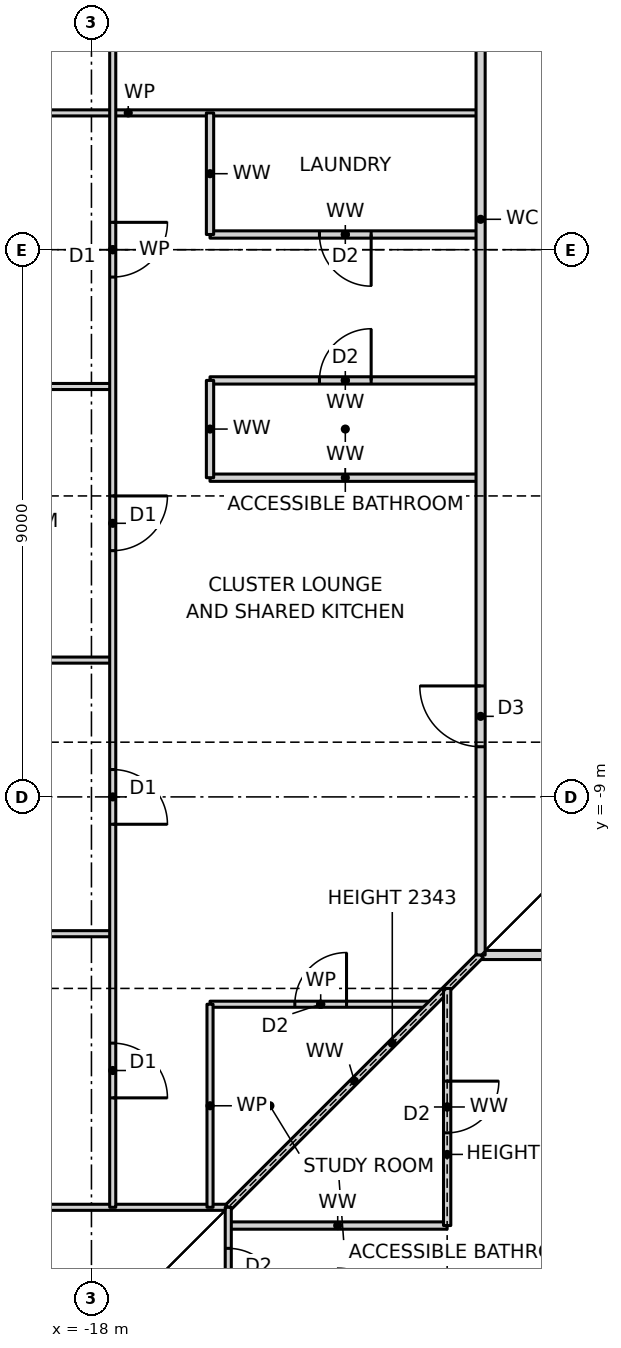
"""IFC4 building model, lengths in metres.
Left out: names, types, materials, properties, quantities, classifications, styles, units other than length and angle.
Written with IfcOpenShell. Run it as: python <this file> out.ifc"""

import sys

from ifc_helpers import new_model, si_unit, direction, frame, frame_2d, origin, place, context, subcontext, project, spatial, rectangle, extrude, element, fill, save


model = new_model("IFC4")
c1 = context("Model", 3, precision=1e-05, world=origin(), true_north=direction((0.0, 1.0)))
c2 = subcontext(c1, "Body", "Model", "MODEL_VIEW")
j1 = project(units=[si_unit("LENGTHUNIT", "METRE"), si_unit("PLANEANGLEUNIT", "RADIAN")], contexts=[c1])
p1 = place(None, origin())
s1 = spatial("IfcSite", under=j1, at=p1, CompositionType="ELEMENT")
p2 = place(p1, origin())
s2 = spatial("IfcBuilding", under=s1, at=p2, CompositionType="ELEMENT")
p3 = place(p2, frame((0.0, 0.0, 60.5)))
s3 = spatial("IfcBuildingStorey", under=s2, at=p3, CompositionType="ELEMENT", Elevation=60.5)
p4 = place(p3, frame((-15.75, -16.05, 0.0), z_axis=(0.0, 0.0, 1.0), x_axis=(1.0, 0.0, 0.0)))
e1 = element("IfcWall", 1, at=p4, inside=s3, PredefinedType="PARTITIONING", context=c2, shape_type="SweptSolid", body=[
    extrude(rectangle(XDim=3.6, YDim=0.12, at=frame_2d((1.8, 0.0))), origin(), (0.0, 0.0, 1.0), 3.27),
])
p5 = place(p3, frame((-23.19, -15.75, 0.0), z_axis=(0.0, 0.0, 1.0), x_axis=(1.0, 0.0, 0.0)))
e2 = element("IfcWall", 2, at=p5, inside=s3, PredefinedType="PARTITIONING", context=c2, shape_type="SweptSolid", body=[
    extrude(rectangle(XDim=7.44, YDim=0.1, at=frame_2d((3.72, 0.0))), origin(), (0.0, 0.0, 1.0), 3.27),
])
p6 = place(p3, frame((-16.05, -12.41, 0.0), z_axis=(0.0, 0.0, 1.0), x_axis=(1.0, 0.0, 0.0)))
e3 = element("IfcWall", 3, at=p6, inside=s3, PredefinedType="PARTITIONING", context=c2, shape_type="SweptSolid", body=[
    extrude(rectangle(XDim=3.64, YDim=0.1, at=frame_2d((1.82, 0.0))), origin(), (0.0, 0.0, 1.0), 3.27),
])
p7 = place(p6, frame((1.395, 0.0, 0.0)))
e4 = element("IfcOpeningElement", 4, at=p7, cuts=e3, PredefinedType="OPENING", context=c2, shape_type="SweptSolid", body=[
    extrude(rectangle(XDim=0.85, YDim=2.1, at=frame_2d((0.425, 1.05))), frame((0.0, 0.06, 0.0), z_axis=(0.0, -1.0, 0.0), x_axis=(1.0, 0.0, 0.0)), (0.0, 0.0, 1.0), 0.12),
])
p8 = place(p3, frame((-11.6, -11.6, 0.0), z_axis=(0.0, 0.0, 1.0), x_axis=(1.0, 0.0, 0.0)))
e5 = element("IfcWall", 5, at=p8, inside=s3, PredefinedType="PARTITIONING", context=c2, shape_type="SweptSolid", body=[
    extrude(rectangle(XDim=23.2, YDim=0.15, at=frame_2d((11.6, 0.0))), origin(), (0.0, 0.0, 1.0), 3.27),
])
p9 = place(p8, frame((2.655, 0.0, 0.0)))
e6 = element("IfcOpeningElement", 6, at=p9, cuts=e5, PredefinedType="OPENING", context=c2, shape_type="SweptSolid", body=[
    extrude(rectangle(XDim=1.0, YDim=2.1, at=frame_2d((0.5, 1.05))), frame((0.0, 0.085, 0.0), z_axis=(0.0, -1.0, 0.0), x_axis=(1.0, 0.0, 0.0)), (0.0, 0.0, 1.0), 0.17),
])
p10 = place(p8, frame((12.5, 0.0, 0.0)))
e7 = element("IfcOpeningElement", 7, at=p10, cuts=e5, PredefinedType="OPENING", context=c2, shape_type="SweptSolid", body=[
    extrude(rectangle(XDim=0.9, YDim=2.1, at=frame_2d((0.45, 1.05))), frame((0.0, 0.085, 0.0), z_axis=(0.0, -1.0, 0.0), x_axis=(1.0, 0.0, 0.0)), (0.0, 0.0, 1.0), 0.17),
])
p11 = place(p8, frame((21.025, 0.0, 0.0)))
e8 = element("IfcOpeningElement", 8, at=p11, cuts=e5, PredefinedType="OPENING", context=c2, shape_type="SweptSolid", body=[
    extrude(rectangle(XDim=1.0, YDim=2.1, at=frame_2d((0.5, 1.05))), frame((0.0, 0.085, 0.0), z_axis=(0.0, -1.0, 0.0), x_axis=(1.0, 0.0, 0.0)), (0.0, 0.0, 1.0), 0.17),
])
for number, where, z_axis, x_axis in (
    (9, (-23.19, -11.25, 0.0), (0.0, 0.0, 1.0), (1.0, 0.0, 0.0)),
    (10, (-23.19, -6.75, 0.0), (0.0, 0.0, 1.0), (1.0, 0.0, 0.0)),
):
    element("IfcWall", number, at=place(p3, frame(where, z_axis=z_axis, x_axis=x_axis)), inside=s3, PredefinedType="PARTITIONING", context=c2, shape_type="SweptSolid", body=[
        extrude(rectangle(XDim=5.54, YDim=0.1, at=frame_2d((2.77, 0.0))), origin(), (0.0, 0.0, 1.0), 3.27),
    ])
p12 = place(p3, frame((-16.05, -3.75, 0.0), z_axis=(0.0, 0.0, 1.0), x_axis=(1.0, 0.0, 0.0)))
e11 = element("IfcWall", 11, at=p12, inside=s3, PredefinedType="PARTITIONING", context=c2, shape_type="SweptSolid", body=[
    extrude(rectangle(XDim=4.45, YDim=0.12, at=frame_2d((2.225, 0.0))), origin(), (0.0, 0.0, 1.0), 3.27),
])
p13 = place(p3, frame((-23.19, -2.25, 0.0), z_axis=(0.0, 0.0, 1.0), x_axis=(1.0, 0.0, 0.0)))
e12 = element("IfcWall", 12, at=p13, inside=s3, PredefinedType="PARTITIONING", context=c2, shape_type="SweptSolid", body=[
    extrude(rectangle(XDim=5.54, YDim=0.1, at=frame_2d((2.77, 0.0))), origin(), (0.0, 0.0, 1.0), 3.27),
])
p14 = place(p3, frame((-16.05, -2.15, 0.0), z_axis=(0.0, 0.0, 1.0), x_axis=(1.0, 0.0, 0.0)))
e13 = element("IfcWall", 13, at=p14, inside=s3, PredefinedType="PARTITIONING", context=c2, shape_type="SweptSolid", body=[
    extrude(rectangle(XDim=4.45, YDim=0.12, at=frame_2d((2.225, 0.0))), origin(), (0.0, 0.0, 1.0), 3.27),
])
p15 = place(p14, frame((1.8, 0.0, 0.0)))
e14 = element("IfcOpeningElement", 14, at=p15, cuts=e13, PredefinedType="OPENING", context=c2, shape_type="SweptSolid", body=[
    extrude(rectangle(XDim=0.85, YDim=2.1, at=frame_2d((0.425, 1.05))), frame((0.0, 0.07, 0.0), z_axis=(0.0, -1.0, 0.0), x_axis=(1.0, 0.0, 0.0)), (0.0, 0.0, 1.0), 0.14),
])
p16 = place(p3, frame((-16.05, 0.25, 0.0), z_axis=(0.0, 0.0, 1.0), x_axis=(1.0, 0.0, 0.0)))
e15 = element("IfcWall", 15, at=p16, inside=s3, PredefinedType="PARTITIONING", context=c2, shape_type="SweptSolid", body=[
    extrude(rectangle(XDim=4.45, YDim=0.12, at=frame_2d((2.225, 0.0))), origin(), (0.0, 0.0, 1.0), 3.27),
])
p17 = place(p16, frame((1.8, 0.0, 0.0)))
e16 = element("IfcOpeningElement", 16, at=p17, cuts=e15, PredefinedType="OPENING", context=c2, shape_type="SweptSolid", body=[
    extrude(rectangle(XDim=0.85, YDim=2.1, at=frame_2d((0.425, 1.05))), frame((0.0, 0.07, 0.0), z_axis=(0.0, -1.0, 0.0), x_axis=(1.0, 0.0, 0.0)), (0.0, 0.0, 1.0), 0.14),
])
p18 = place(p3, frame((-23.19, 2.25, 0.0), z_axis=(0.0, 0.0, 1.0), x_axis=(1.0, 0.0, 0.0)))
e17 = element("IfcWall", 17, at=p18, inside=s3, PredefinedType="PARTITIONING", context=c2, shape_type="SweptSolid", body=[
    extrude(rectangle(XDim=11.59, YDim=0.1, at=frame_2d((5.795, 0.0))), origin(), (0.0, 0.0, 1.0), 3.27),
])
p19 = place(p3, frame((-15.75, -15.75, 0.0), z_axis=(0.0, 0.0, 1.0), x_axis=(0.707106781187, 0.707106781187, 0.0)))
e18 = element("IfcWall", 18, at=p19, inside=s3, PredefinedType="PARTITIONING", context=c2, shape_type="SweptSolid", body=[
    extrude(rectangle(XDim=5.869, YDim=0.12, at=frame_2d((2.935, 0.0))), origin(), (0.0, 0.0, 1.0), 2.343),
])
p20 = place(p3, frame((-11.6, -11.6, 0.0), z_axis=(0.0, 0.0, 1.0), x_axis=(0.0, 1.0, 0.0)))
e19 = element("IfcWall", 19, at=p20, inside=s3, PredefinedType="PARTITIONING", context=c2, shape_type="SweptSolid", body=[
    extrude(rectangle(XDim=24.2, YDim=0.15, at=frame_2d((12.1, 0.0))), origin(), (0.0, 0.0, 1.0), 3.27),
])
p21 = place(p20, frame((19.225, 0.0, 0.0)))
e20 = element("IfcOpeningElement", 20, at=p21, cuts=e19, PredefinedType="OPENING", context=c2, shape_type="SweptSolid", body=[
    extrude(rectangle(XDim=1.0, YDim=2.1, at=frame_2d((0.5, 1.05))), frame((0.0, 0.085, 0.0), z_axis=(0.0, -1.0, 0.0), x_axis=(1.0, 0.0, 0.0)), (0.0, 0.0, 1.0), 0.17),
])
p22 = place(p20, frame((3.425, 0.0, 0.0)))
e21 = element("IfcOpeningElement", 21, at=p22, cuts=e19, PredefinedType="OPENING", context=c2, shape_type="SweptSolid", body=[
    extrude(rectangle(XDim=1.0, YDim=2.1, at=frame_2d((0.5, 1.05))), frame((0.0, 0.085, 0.0), z_axis=(0.0, -1.0, 0.0), x_axis=(1.0, 0.0, 0.0)), (0.0, 0.0, 1.0), 0.17),
])
p23 = place(p3, frame((-12.15, -16.05, 0.0), z_axis=(0.0, 0.0, 1.0), x_axis=(0.0, 1.0, 0.0)))
e22 = element("IfcWall", 22, at=p23, inside=s3, PredefinedType="PARTITIONING", context=c2, shape_type="SweptSolid", body=[
    extrude(rectangle(XDim=3.9, YDim=0.12, at=frame_2d((1.95, 0.0))), origin(), (0.0, 0.0, 1.0), 2.508),
])
p24 = place(p23, frame((1.525, 0.0, 0.0)))
e23 = element("IfcOpeningElement", 23, at=p24, cuts=e22, PredefinedType="OPENING", context=c2, shape_type="SweptSolid", body=[
    extrude(rectangle(XDim=0.85, YDim=2.1, at=frame_2d((0.425, 1.05))), frame((0.0, 0.07, 0.0), z_axis=(0.0, -1.0, 0.0), x_axis=(1.0, 0.0, 0.0)), (0.0, 0.0, 1.0), 0.14),
])
p25 = place(p3, frame((-15.75, -23.19, 0.0), z_axis=(0.0, 0.0, 1.0), x_axis=(0.0, 1.0, 0.0)))
e24 = element("IfcWall", 24, at=p25, inside=s3, PredefinedType="PARTITIONING", context=c2, shape_type="SweptSolid", body=[
    extrude(rectangle(XDim=7.44, YDim=0.1, at=frame_2d((3.72, 0.0))), origin(), (0.0, 0.0, 1.0), 3.27),
])
p26 = place(p25, frame((5.915, 0.0, 0.0)))
e25 = element("IfcOpeningElement", 25, at=p26, cuts=e24, PredefinedType="OPENING", context=c2, shape_type="SweptSolid", body=[
    extrude(rectangle(XDim=0.85, YDim=2.1, at=frame_2d((0.425, 1.05))), frame((0.0, 0.06, 0.0), z_axis=(0.0, -1.0, 0.0), x_axis=(1.0, 0.0, 0.0)), (0.0, 0.0, 1.0), 0.12),
])
p27 = place(p3, frame((-16.05, -15.75, 0.0), z_axis=(0.0, 0.0, 1.0), x_axis=(0.0, 1.0, 0.0)))
e26 = element("IfcWall", 26, at=p27, inside=s3, PredefinedType="PARTITIONING", context=c2, shape_type="SweptSolid", body=[
    extrude(rectangle(XDim=3.34, YDim=0.1, at=frame_2d((1.67, 0.0))), origin(), (0.0, 0.0, 1.0), 3.27),
])
p28 = place(p3, frame((-16.05, -3.75, 0.0), z_axis=(0.0, 0.0, 1.0), x_axis=(0.0, 1.0, 0.0)))
e27 = element("IfcWall", 27, at=p28, inside=s3, PredefinedType="PARTITIONING", context=c2, shape_type="SweptSolid", body=[
    extrude(rectangle(XDim=1.6, YDim=0.12, at=frame_2d((0.8, 0.0))), origin(), (0.0, 0.0, 1.0), 3.27),
])
p29 = place(p3, frame((-16.05, 0.25, 0.0), z_axis=(0.0, 0.0, 1.0), x_axis=(0.0, 1.0, 0.0)))
e28 = element("IfcWall", 28, at=p29, inside=s3, PredefinedType="PARTITIONING", context=c2, shape_type="SweptSolid", body=[
    extrude(rectangle(XDim=2.0, YDim=0.12, at=frame_2d((1.0, 0.0))), origin(), (0.0, 0.0, 1.0), 3.27),
])
p30 = place(p3, frame((-17.65, -15.75, 0.0), z_axis=(0.0, 0.0, 1.0), x_axis=(0.0, 1.0, 0.0)))
e29 = element("IfcWall", 29, at=p30, inside=s3, PredefinedType="PARTITIONING", context=c2, shape_type="SweptSolid", body=[
    extrude(rectangle(XDim=31.5, YDim=0.1, at=frame_2d((15.75, 0.0))), origin(), (0.0, 0.0, 1.0), 3.27),
])
p31 = place(p30, frame((28.8, 0.0, 0.0)))
e30 = element("IfcOpeningElement", 30, at=p31, cuts=e29, PredefinedType="OPENING", context=c2, shape_type="SweptSolid", body=[
    extrude(rectangle(XDim=0.9, YDim=2.1, at=frame_2d((0.45, 1.05))), frame((0.0, 0.06, 0.0), z_axis=(0.0, -1.0, 0.0), x_axis=(1.0, 0.0, 0.0)), (0.0, 0.0, 1.0), 0.12),
])
p32 = place(p30, frame((24.3, 0.0, 0.0)))
e31 = element("IfcOpeningElement", 31, at=p32, cuts=e29, PredefinedType="OPENING", context=c2, shape_type="SweptSolid", body=[
    extrude(rectangle(XDim=0.9, YDim=2.1, at=frame_2d((0.45, 1.05))), frame((0.0, 0.06, 0.0), z_axis=(0.0, -1.0, 0.0), x_axis=(1.0, 0.0, 0.0)), (0.0, 0.0, 1.0), 0.12),
])
p33 = place(p30, frame((19.8, 0.0, 0.0)))
e32 = element("IfcOpeningElement", 32, at=p33, cuts=e29, PredefinedType="OPENING", context=c2, shape_type="SweptSolid", body=[
    extrude(rectangle(XDim=0.9, YDim=2.1, at=frame_2d((0.45, 1.05))), frame((0.0, 0.06, 0.0), z_axis=(0.0, -1.0, 0.0), x_axis=(1.0, 0.0, 0.0)), (0.0, 0.0, 1.0), 0.12),
])
p34 = place(p30, frame((15.3, 0.0, 0.0)))
e33 = element("IfcOpeningElement", 33, at=p34, cuts=e29, PredefinedType="OPENING", context=c2, shape_type="SweptSolid", body=[
    extrude(rectangle(XDim=0.9, YDim=2.1, at=frame_2d((0.45, 1.05))), frame((0.0, 0.06, 0.0), z_axis=(0.0, -1.0, 0.0), x_axis=(1.0, 0.0, 0.0)), (0.0, 0.0, 1.0), 0.12),
])
p35 = place(p30, frame((10.8, 0.0, 0.0)))
e34 = element("IfcOpeningElement", 34, at=p35, cuts=e29, PredefinedType="OPENING", context=c2, shape_type="SweptSolid", body=[
    extrude(rectangle(XDim=0.9, YDim=2.1, at=frame_2d((0.45, 1.05))), frame((0.0, 0.06, 0.0), z_axis=(0.0, -1.0, 0.0), x_axis=(1.0, 0.0, 0.0)), (0.0, 0.0, 1.0), 0.12),
])
p36 = place(p30, frame((6.3, 0.0, 0.0)))
e35 = element("IfcOpeningElement", 35, at=p36, cuts=e29, PredefinedType="OPENING", context=c2, shape_type="SweptSolid", body=[
    extrude(rectangle(XDim=0.9, YDim=2.1, at=frame_2d((0.45, 1.05))), frame((0.0, 0.06, 0.0), z_axis=(0.0, -1.0, 0.0), x_axis=(1.0, 0.0, 0.0)), (0.0, 0.0, 1.0), 0.12),
])
p37 = place(p30, frame((1.8, 0.0, 0.0)))
e36 = element("IfcOpeningElement", 36, at=p37, cuts=e29, PredefinedType="OPENING", context=c2, shape_type="SweptSolid", body=[
    extrude(rectangle(XDim=0.9, YDim=2.1, at=frame_2d((0.45, 1.05))), frame((0.0, 0.06, 0.0), z_axis=(0.0, -1.0, 0.0), x_axis=(1.0, 0.0, 0.0)), (0.0, 0.0, 1.0), 0.12),
])
p38 = place(p24, frame((0.85, 0.0, 0.0), z_axis=(0.0, 0.0, 1.0), x_axis=(-1.0, 0.0, 0.0)))
e37 = element("IfcDoor", 37, at=p38, inside=s3, OperationType="SINGLE_SWING_LEFT", PredefinedType="DOOR", context=c2, shape_type="SweptSolid", body=[
    extrude(rectangle(XDim=0.85, YDim=2.1, at=frame_2d((0.425, 1.05))), frame((0.0, 0.025, 0.0), z_axis=(0.0, -1.0, 0.0), x_axis=(1.0, 0.0, 0.0)), (0.0, 0.0, 1.0), 0.05),
])
fill(e23, e37)
p39 = place(p34, frame((0.9, 0.0, 0.0), z_axis=(0.0, 0.0, 1.0), x_axis=(-1.0, 0.0, 0.0)))
e38 = element("IfcDoor", 38, at=p39, inside=s3, OperationType="SINGLE_SWING_LEFT", PredefinedType="DOOR", context=c2, shape_type="SweptSolid", body=[
    extrude(rectangle(XDim=0.9, YDim=2.1, at=frame_2d((0.45, 1.05))), frame((0.0, 0.025, 0.0), z_axis=(0.0, -1.0, 0.0), x_axis=(1.0, 0.0, 0.0)), (0.0, 0.0, 1.0), 0.05),
])
fill(e33, e38)
p40 = place(p35, frame((0.9, 0.0, 0.0), z_axis=(0.0, 0.0, 1.0), x_axis=(-1.0, 0.0, 0.0)))
e39 = element("IfcDoor", 39, at=p40, inside=s3, OperationType="SINGLE_SWING_LEFT", PredefinedType="DOOR", context=c2, shape_type="SweptSolid", body=[
    extrude(rectangle(XDim=0.9, YDim=2.1, at=frame_2d((0.45, 1.05))), frame((0.0, 0.025, 0.0), z_axis=(0.0, -1.0, 0.0), x_axis=(1.0, 0.0, 0.0)), (0.0, 0.0, 1.0), 0.05),
])
fill(e34, e39)
p41 = place(p36, frame((0.9, 0.0, 0.0), z_axis=(0.0, 0.0, 1.0), x_axis=(-1.0, 0.0, 0.0)))
e40 = element("IfcDoor", 40, at=p41, inside=s3, OperationType="SINGLE_SWING_RIGHT", PredefinedType="DOOR", context=c2, shape_type="SweptSolid", body=[
    extrude(rectangle(XDim=0.9, YDim=2.1, at=frame_2d((0.45, 1.05))), frame((0.0, 0.025, 0.0), z_axis=(0.0, -1.0, 0.0), x_axis=(1.0, 0.0, 0.0)), (0.0, 0.0, 1.0), 0.05),
])
fill(e35, e40)
p42 = place(p37, frame((0.9, 0.0, 0.0), z_axis=(0.0, 0.0, 1.0), x_axis=(-1.0, 0.0, 0.0)))
e41 = element("IfcDoor", 41, at=p42, inside=s3, OperationType="SINGLE_SWING_RIGHT", PredefinedType="DOOR", context=c2, shape_type="SweptSolid", body=[
    extrude(rectangle(XDim=0.9, YDim=2.1, at=frame_2d((0.45, 1.05))), frame((0.0, 0.025, 0.0), z_axis=(0.0, -1.0, 0.0), x_axis=(1.0, 0.0, 0.0)), (0.0, 0.0, 1.0), 0.05),
])
fill(e36, e41)
p43 = place(p22, origin())
e42 = element("IfcDoor", 42, at=p43, inside=s3, OperationType="SINGLE_SWING_RIGHT", PredefinedType="DOOR", context=c2, shape_type="SweptSolid", body=[
    extrude(rectangle(XDim=1.0, YDim=2.1, at=frame_2d((0.5, 1.05))), frame((0.0, 0.025, 0.0), z_axis=(0.0, -1.0, 0.0), x_axis=(1.0, 0.0, 0.0)), (0.0, 0.0, 1.0), 0.05),
])
fill(e21, e42)
p44 = place(p17, frame((0.85, 0.0, 0.0), z_axis=(0.0, 0.0, 1.0), x_axis=(-1.0, 0.0, 0.0)))
e43 = element("IfcDoor", 43, at=p44, inside=s3, OperationType="SINGLE_SWING_LEFT", PredefinedType="DOOR", context=c2, shape_type="SweptSolid", body=[
    extrude(rectangle(XDim=0.85, YDim=2.1, at=frame_2d((0.425, 1.05))), frame((0.0, 0.025, 0.0), z_axis=(0.0, -1.0, 0.0), x_axis=(1.0, 0.0, 0.0)), (0.0, 0.0, 1.0), 0.05),
])
fill(e16, e43)
p45 = place(p15, origin())
e44 = element("IfcDoor", 44, at=p45, inside=s3, OperationType="SINGLE_SWING_RIGHT", PredefinedType="DOOR", context=c2, shape_type="SweptSolid", body=[
    extrude(rectangle(XDim=0.85, YDim=2.1, at=frame_2d((0.425, 1.05))), frame((0.0, 0.025, 0.0), z_axis=(0.0, -1.0, 0.0), x_axis=(1.0, 0.0, 0.0)), (0.0, 0.0, 1.0), 0.05),
])
fill(e14, e44)
p46 = place(p7, origin())
e45 = element("IfcDoor", 45, at=p46, inside=s3, OperationType="SINGLE_SWING_RIGHT", PredefinedType="DOOR", context=c2, shape_type="SweptSolid", body=[
    extrude(rectangle(XDim=0.85, YDim=2.1, at=frame_2d((0.425, 1.05))), frame((0.0, 0.025, 0.0), z_axis=(0.0, -1.0, 0.0), x_axis=(1.0, 0.0, 0.0)), (0.0, 0.0, 1.0), 0.05),
])
fill(e4, e45)
p47 = place(p26, frame((0.85, 0.0, 0.0), z_axis=(0.0, 0.0, 1.0), x_axis=(-1.0, 0.0, 0.0)))
e46 = element("IfcDoor", 46, at=p47, inside=s3, OperationType="SINGLE_SWING_RIGHT", PredefinedType="DOOR", context=c2, shape_type="SweptSolid", body=[
    extrude(rectangle(XDim=0.85, YDim=2.1, at=frame_2d((0.425, 1.05))), frame((0.0, 0.025, 0.0), z_axis=(0.0, -1.0, 0.0), x_axis=(1.0, 0.0, 0.0)), (0.0, 0.0, 1.0), 0.05),
])
fill(e25, e46)
save(model, sys.argv[1])
